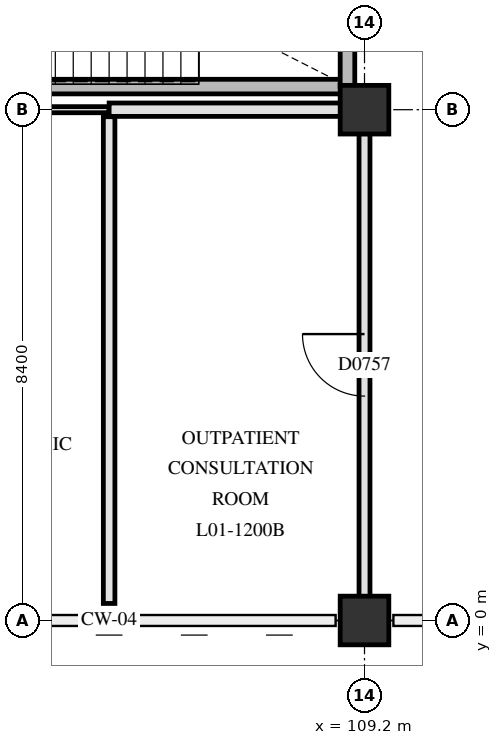
"""IFC4 building model, lengths in metres.
Left out: names, types, materials, properties, quantities, classifications, styles, units other than length and angle.
Written with IfcOpenShell. Run it as: python <this file> out.ifc"""

import sys

from ifc_helpers import new_model, si_unit, direction, frame, frame_2d, origin, origin_2d, place, context, subcontext, project, spatial, rectangle, extrude, element, fill, save


model = new_model("IFC4")
c1 = context("Model", 3, precision=1e-05, world=origin(), true_north=direction((0.0, 1.0)))
c2 = subcontext(c1, "Body", "Model", "MODEL_VIEW")
j1 = project(units=[si_unit("LENGTHUNIT", "METRE"), si_unit("PLANEANGLEUNIT", "RADIAN")], contexts=[c1])
p1 = place(None, origin())
s1 = spatial("IfcSite", under=j1, at=p1, CompositionType="ELEMENT")
p2 = place(p1, origin())
s2 = spatial("IfcBuilding", under=s1, at=p2, CompositionType="ELEMENT")
p3 = place(p2, frame((0.0, 0.0, 4.8)))
s3 = spatial("IfcBuildingStorey", under=s2, at=p3, CompositionType="ELEMENT", Elevation=4.8)
for number, where, z_axis, x_axis in (
    (1, (109.2, 0.0, 0.0), (0.0, 0.0, 1.0), (1.0, 0.0, 0.0)),
    (2, (109.2, 8.4, 0.0), (0.0, 0.0, 1.0), (1.0, 0.0, 0.0)),
):
    element("IfcColumn", number, at=place(p3, frame(where, z_axis=z_axis, x_axis=x_axis)), inside=s3, PredefinedType="COLUMN", context=c2, shape_type="SweptSolid", body=[
        extrude(rectangle(XDim=0.8, YDim=0.8, at=origin_2d()), origin(), (0.0, 0.0, 1.0), 4.5),
    ])
p4 = place(p3, frame((101.1, 8.78, 0.0), z_axis=(0.0, 0.0, 1.0), x_axis=(1.0, 0.0, 0.0)))
e3 = element("IfcWall", 3, at=p4, inside=s3, PredefinedType="SHEAR", context=c2, shape_type="SweptSolid", body=[
    extrude(rectangle(XDim=7.82, YDim=0.24, at=frame_2d((3.91, 0.0))), origin(), (0.0, 0.0, 1.0), 4.15),
])
p5 = place(p3, frame((108.92, 8.78, 0.0), z_axis=(0.0, 0.0, 1.0), x_axis=(0.0, 1.0, 0.0)))
e4 = element("IfcWall", 4, at=p5, inside=s3, PredefinedType="SHEAR", context=c2, shape_type="SweptSolid", body=[
    extrude(rectangle(XDim=3.32, YDim=0.24, at=frame_2d((1.66, 0.0))), origin(), (0.0, 0.0, 1.0), 4.15),
])
p6 = place(p3, frame((101.195, 8.4, 0.0), z_axis=(0.0, 0.0, 1.0), x_axis=(1.0, 0.0, 0.0)))
e5 = element("IfcWall", 5, at=p6, inside=s3, PredefinedType="PARTITIONING", context=c2, shape_type="SweptSolid", body=[
    extrude(rectangle(XDim=3.805, YDim=0.1, at=frame_2d((1.902, 0.0))), origin(), (0.0, 0.0, 1.0), 3.54),
])
p7 = place(p3, frame((105.0, 8.4, 0.0), z_axis=(0.0, 0.0, 1.0), x_axis=(1.0, 0.0, 0.0)))
e6 = element("IfcWall", 6, at=p7, inside=s3, PredefinedType="PARTITIONING", context=c2, shape_type="SweptSolid", body=[
    extrude(rectangle(XDim=3.805, YDim=0.22, at=frame_2d((1.902, 0.0))), origin(), (0.0, 0.0, 1.0), 3.54),
])
p8 = place(p3, frame((105.0, 0.28, 0.0), z_axis=(0.0, 0.0, 1.0), x_axis=(0.0, 1.0, 0.0)))
e7 = element("IfcWall", 7, at=p8, inside=s3, PredefinedType="PARTITIONING", context=c2, shape_type="SweptSolid", body=[
    extrude(rectangle(XDim=8.005, YDim=0.19, at=frame_2d((4.002, 0.0))), origin(), (0.0, 0.0, 1.0), 3.54),
])
p9 = place(p3, frame((109.2, 0.395, 0.0), z_axis=(0.0, 0.0, 1.0), x_axis=(0.0, 1.0, 0.0)))
e8 = element("IfcWall", 8, at=p9, inside=s3, PredefinedType="PARTITIONING", context=c2, shape_type="SweptSolid", body=[
    extrude(rectangle(XDim=7.61, YDim=0.18, at=frame_2d((3.805, 0.0))), origin(), (0.0, 0.0, 1.0), 3.59),
])
p10 = place(p9, frame((3.295, 0.0, 0.0)))
e9 = element("IfcOpeningElement", 9, at=p10, cuts=e8, PredefinedType="OPENING", context=c2, shape_type="SweptSolid", body=[
    extrude(rectangle(XDim=1.02, YDim=2.12, at=frame_2d((0.51, 1.06))), frame((0.0, 0.1, 0.0), z_axis=(0.0, -1.0, 0.0), x_axis=(1.0, 0.0, 0.0)), (0.0, 0.0, 1.0), 0.2),
])
p11 = place(p10, origin())
e10 = element("IfcDoor", 10, at=p11, inside=s3, OperationType="SINGLE_SWING_RIGHT", PredefinedType="DOOR", context=c2, shape_type="SweptSolid", body=[
    extrude(rectangle(XDim=1.02, YDim=2.12, at=frame_2d((0.51, 1.06))), frame((0.0, 0.025, 0.0), z_axis=(0.0, -1.0, 0.0), x_axis=(1.0, 0.0, 0.0)), (0.0, 0.0, 1.0), 0.05),
])
fill(e9, e10)
save(model, sys.argv[1])
